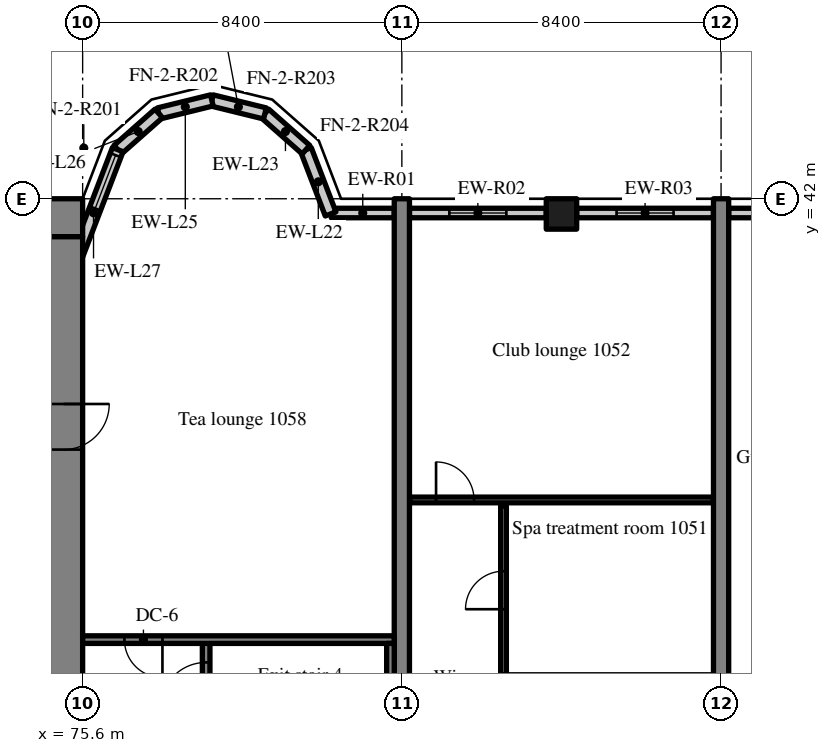
"""IFC4 building model, lengths in metres.
Left out: names, types, materials, properties, quantities, classifications, styles, units other than length and angle.
Written with IfcOpenShell. Run it as: python <this file> out.ifc"""

import sys

from ifc_helpers import new_model, si_unit, direction, frame, frame_2d, origin, origin_2d, place, context, subcontext, project, spatial, rectangle, extrude, source, transform, mapped, element, fill, save


model = new_model("IFC4")
c1 = context("Model", 3, precision=1e-05, world=origin(), true_north=direction((0.0, 1.0)))
c2 = subcontext(c1, "Body", "Model", "MODEL_VIEW")
j1 = project(units=[si_unit("LENGTHUNIT", "METRE"), si_unit("PLANEANGLEUNIT", "RADIAN")], contexts=[c1])
p1 = place(None, origin())
s1 = spatial("IfcSite", under=j1, at=p1, CompositionType="ELEMENT")
p2 = place(p1, origin())
s2 = spatial("IfcBuilding", under=s1, at=p2, CompositionType="ELEMENT")
p3 = place(p2, frame((0.0, 0.0, 46.8)))
s3 = spatial("IfcBuildingStorey", under=s2, at=p3, CompositionType="ELEMENT", Elevation=46.8)
m1 = source(origin(), c2, "Body", "SweptSolid", [
    extrude(rectangle(XDim=50.4, YDim=1.0, at=frame_2d((25.2, 0.0))), origin(), (0.0, 0.0, 1.0), 3.52),
])
p4 = place(p3, frame((25.2, 41.5, 0.0), z_axis=(0.0, 0.0, 1.0), x_axis=(1.0, 0.0, 0.0)))
e1 = element("IfcWall", 1, at=p4, inside=s3, PredefinedType="SHEAR", context=c2, shape_type="MappedRepresentation", body=[
    mapped(m1, transform((0.0, 0.0, 0.0), scale=1.0)),
])
m2 = source(origin(), c2, "Body", "SweptSolid", [
    extrude(rectangle(XDim=18.0, YDim=1.0, at=frame_2d((9.0, 0.0))), origin(), (0.0, 0.0, 1.0), 3.52),
])
p5 = place(p3, frame((75.1, 23.0, 0.0), z_axis=(0.0, 0.0, 1.0), x_axis=(0.0, 1.0, 0.0)))
e2 = element("IfcWall", 2, at=p5, inside=s3, PredefinedType="SHEAR", context=c2, shape_type="MappedRepresentation", body=[
    mapped(m2, transform((0.0, 0.0, 0.0), scale=1.0)),
])
m3 = source(origin(), c2, "Body", "SweptSolid", [
    extrude(rectangle(XDim=1.2, YDim=2.1, at=frame_2d((0.6, 1.05))), frame((0.0, 0.51, 0.0), z_axis=(0.0, -1.0, 0.0), x_axis=(1.0, 0.0, 0.0)), (0.0, 0.0, 1.0), 1.02),
])
p6 = place(p5, frame((12.4, 0.0, 0.0)))
e3 = element("IfcOpeningElement", 3, at=p6, cuts=e2, PredefinedType="OPENING", context=c2, shape_type="MappedRepresentation", body=[
    mapped(m3, transform((0.0, 0.0, 0.0), scale=1.0)),
])
m4 = source(origin(), c2, "Body", "SweptSolid", [
    extrude(rectangle(XDim=20.0, YDim=0.4, at=frame_2d((10.0, 0.0))), origin(), (0.0, 0.0, 1.0), 3.52),
])
for number, where, z_axis, x_axis in (
    (4, (84.0, 22.0, 0.0), (0.0, 0.0, 1.0), (0.0, 1.0, 0.0)),
    (5, (92.4, 22.0, 0.0), (0.0, 0.0, 1.0), (0.0, 1.0, 0.0)),
):
    element("IfcWall", number, at=place(p3, frame(where, z_axis=z_axis, x_axis=x_axis)), inside=s3, PredefinedType="SHEAR", context=c2, shape_type="MappedRepresentation", body=[
        mapped(m4, transform((0.0, 0.0, 0.0), scale=1.0)),
    ])
m5 = source(origin(), c2, "Body", "SweptSolid", [
    extrude(rectangle(XDim=0.8, YDim=0.8, at=origin_2d()), origin(), (0.0, 0.0, 1.0), 3.52),
])
p7 = place(p3, frame((88.2, 41.6, 0.0), z_axis=(0.0, 0.0, 1.0), x_axis=(1.0, 0.0, 0.0)))
e6 = element("IfcColumn", 6, at=p7, inside=s3, PredefinedType="COLUMN", context=c2, shape_type="MappedRepresentation", body=[
    mapped(m5, transform((0.0, 0.0, 0.0), scale=1.0)),
])
m6 = source(origin(), c2, "Body", "SweptSolid", [
    extrude(rectangle(XDim=1.658, YDim=0.25, at=frame_2d((0.829, 0.0))), origin(), (0.0, 0.0, 1.0), 2.82),
])
p8 = place(p3, frame((83.8, 41.625, 0.0), z_axis=(0.0, 0.0, 1.0), x_axis=(-1.0, 0.0, 0.0)))
e7 = element("IfcWall", 7, at=p8, inside=s3, PredefinedType="SOLIDWALL", context=c2, shape_type="MappedRepresentation", body=[
    mapped(m6, transform((0.0, 0.0, 0.0), scale=1.0)),
])
m7 = source(origin(), c2, "Body", "SweptSolid", [
    extrude(rectangle(XDim=3.6, YDim=0.25, at=frame_2d((1.8, 0.0))), origin(), (0.0, 0.0, 1.0), 2.82),
])
p9 = place(p3, frame((87.8, 41.625, 0.0), z_axis=(0.0, 0.0, 1.0), x_axis=(-1.0, 0.0, 0.0)))
e8 = element("IfcWall", 8, at=p9, inside=s3, PredefinedType="SOLIDWALL", context=c2, shape_type="MappedRepresentation", body=[
    mapped(m7, transform((0.0, 0.0, 0.0), scale=1.0)),
])
m8 = source(origin(), c2, "Body", "SweptSolid", [
    extrude(rectangle(XDim=1.5, YDim=1.5, at=frame_2d((0.75, 0.75))), frame((0.0, 0.135, 0.0), z_axis=(0.0, -1.0, 0.0), x_axis=(1.0, 0.0, 0.0)), (0.0, 0.0, 1.0), 0.27),
])
p10 = place(p9, frame((1.05, 0.0, 0.9)))
e9 = element("IfcOpeningElement", 9, at=p10, cuts=e8, PredefinedType="OPENING", context=c2, shape_type="MappedRepresentation", body=[
    mapped(m8, transform((0.0, 0.0, 0.0), scale=1.0)),
])
m9 = source(origin(), c2, "Body", "SweptSolid", [
    extrude(rectangle(XDim=3.6, YDim=0.25, at=frame_2d((1.8, 0.0))), origin(), (0.0, 0.0, 1.0), 2.82),
])
p11 = place(p3, frame((92.2, 41.625, 0.0), z_axis=(0.0, 0.0, 1.0), x_axis=(-1.0, 0.0, 0.0)))
e10 = element("IfcWall", 10, at=p11, inside=s3, PredefinedType="SOLIDWALL", context=c2, shape_type="MappedRepresentation", body=[
    mapped(m9, transform((0.0, 0.0, 0.0), scale=1.0)),
])
p12 = place(p11, frame((1.05, 0.0, 0.9)))
e11 = element("IfcOpeningElement", 11, at=p12, cuts=e10, PredefinedType="OPENING", context=c2, shape_type="MappedRepresentation", body=[
    mapped(m8, transform((0.0, 0.0, 0.0), scale=1.0)),
])
m10 = source(origin(), c2, "Body", "SweptSolid", [
    extrude(rectangle(XDim=4.045, YDim=0.25, at=frame_2d((2.022, 0.0))), origin(), (0.0, 0.0, 1.0), 2.82),
])
p13 = place(p3, frame((96.645, 41.625, 0.0), z_axis=(0.0, 0.0, 1.0), x_axis=(-1.0, 0.0, 0.0)))
e12 = element("IfcWall", 12, at=p13, inside=s3, PredefinedType="SOLIDWALL", context=c2, shape_type="MappedRepresentation", body=[
    mapped(m10, transform((0.0, 0.0, 0.0), scale=1.0)),
])
p14 = place(p13, frame((1.272, 0.0, 0.9)))
e13 = element("IfcOpeningElement", 13, at=p14, cuts=e12, PredefinedType="OPENING", context=c2, shape_type="MappedRepresentation", body=[
    mapped(m8, transform((0.0, 0.0, 0.0), scale=1.0)),
])
m11 = source(origin(), c2, "Body", "SweptSolid", [
    extrude(rectangle(XDim=1.812, YDim=0.3, at=frame_2d((0.906, 0.0))), origin(), (0.0, 0.0, 1.0), 3.52),
])
p15 = place(p3, frame((82.125, 41.6, 0.0), z_axis=(0.0, 0.0, 1.0), x_axis=(-0.357877270961, 0.93376863244, 0.0)))
e14 = element("IfcWall", 14, at=p15, inside=s3, PredefinedType="SOLIDWALL", context=c2, shape_type="MappedRepresentation", body=[
    mapped(m11, transform((0.0, 0.0, 0.0), scale=1.0)),
])
m12 = source(origin(), c2, "Body", "SweptSolid", [
    extrude(rectangle(XDim=1.44, YDim=0.3, at=frame_2d((0.72, 0.0))), origin(), (0.0, 0.0, 1.0), 3.52),
])
p16 = place(p3, frame((81.477, 43.292, 0.0), z_axis=(0.0, 0.0, 1.0), x_axis=(-0.74957555648, 0.661918790432, 0.0)))
e15 = element("IfcWall", 15, at=p16, inside=s3, PredefinedType="SOLIDWALL", context=c2, shape_type="MappedRepresentation", body=[
    mapped(m12, transform((0.0, 0.0, 0.0), scale=1.0)),
])
m13 = source(origin(), c2, "Body", "SweptSolid", [
    extrude(rectangle(XDim=1.439, YDim=0.3, at=frame_2d((0.719, 0.0))), origin(), (0.0, 0.0, 1.0), 3.52),
])
for number, where, z_axis, x_axis in (
    (16, (80.397, 44.245, 0.0), (0.0, 0.0, 1.0), (-0.971, 0.238, 0.0)),
    (17, (79.0, 44.588, 0.0), (0.0, 0.0, 1.0), (-0.971, -0.238, 0.0)),
):
    element("IfcWall", number, at=place(p3, frame(where, z_axis=z_axis, x_axis=x_axis)), inside=s3, PredefinedType="SOLIDWALL", context=c2, shape_type="MappedRepresentation", body=[
        mapped(m13, transform((0.0, 0.0, 0.0), scale=1.0)),
    ])
p17 = place(p3, frame((77.603, 44.245, 0.0), z_axis=(0.0, 0.0, 1.0), x_axis=(-0.74957555648, -0.661918790432, 0.0)))
e18 = element("IfcWall", 18, at=p17, inside=s3, PredefinedType="SOLIDWALL", context=c2, shape_type="MappedRepresentation", body=[
    mapped(m12, transform((0.0, 0.0, 0.0), scale=1.0)),
])
m14 = source(origin(), c2, "Body", "SweptSolid", [
    extrude(rectangle(XDim=3.559, YDim=0.3, at=frame_2d((1.78, 0.0))), origin(), (0.0, 0.0, 1.0), 3.52),
])
p18 = place(p3, frame((76.523, 43.292, 0.0), z_axis=(0.0, 0.0, 1.0), x_axis=(-0.35779745313, -0.933799219604, 0.0)))
e19 = element("IfcWall", 19, at=p18, inside=s3, PredefinedType="SOLIDWALL", context=c2, shape_type="MappedRepresentation", body=[
    mapped(m14, transform((0.0, 0.0, 0.0), scale=1.0)),
])
m15 = source(origin(), c2, "Body", "SweptSolid", [
    extrude(rectangle(XDim=1.5, YDim=2.0, at=frame_2d((0.75, 1.0))), frame((0.0, 0.16, 0.0), z_axis=(0.0, -1.0, 0.0), x_axis=(1.0, 0.0, 0.0)), (0.0, 0.0, 1.0), 0.32),
])
p19 = place(p18, frame((0.156, 0.0, 0.9)))
e20 = element("IfcOpeningElement", 20, at=p19, cuts=e19, PredefinedType="OPENING", context=c2, shape_type="MappedRepresentation", body=[
    mapped(m15, transform((0.0, 0.0, 0.0), scale=1.0)),
])
m16 = source(origin(), c2, "Body", "SweptSolid", [
    extrude(rectangle(XDim=8.3, YDim=0.2, at=frame_2d((4.15, 0.0))), origin(), (0.0, 0.0, 1.0), 3.52),
])
p20 = place(p3, frame((78.85, 22.1, 0.0), z_axis=(0.0, 0.0, 1.0), x_axis=(0.0, 1.0, 0.0)))
e21 = element("IfcWall", 21, at=p20, inside=s3, PredefinedType="SOLIDWALL", context=c2, shape_type="MappedRepresentation", body=[
    mapped(m16, transform((0.0, 0.0, 0.0), scale=1.0)),
])
m17 = source(origin(), c2, "Body", "SweptSolid", [
    extrude(rectangle(XDim=1.2, YDim=2.1, at=frame_2d((0.6, 1.05))), frame((0.0, 0.11, 0.0), z_axis=(0.0, -1.0, 0.0), x_axis=(1.0, 0.0, 0.0)), (0.0, 0.0, 1.0), 0.22),
])
p21 = place(p20, frame((6.5, 0.0, 0.0)))
e22 = element("IfcOpeningElement", 22, at=p21, cuts=e21, PredefinedType="OPENING", context=c2, shape_type="MappedRepresentation", body=[
    mapped(m17, transform((0.0, 0.0, 0.0), scale=1.0)),
])
m18 = source(origin(), c2, "Body", "SweptSolid", [
    extrude(rectangle(XDim=8.2, YDim=0.2, at=frame_2d((4.1, 0.0))), origin(), (0.0, 0.0, 1.0), 3.52),
])
p22 = place(p3, frame((83.8, 30.4, 0.0), z_axis=(0.0, 0.0, 1.0), x_axis=(-1.0, 0.0, 0.0)))
e23 = element("IfcWall", 23, at=p22, inside=s3, PredefinedType="SOLIDWALL", context=c2, shape_type="MappedRepresentation", body=[
    mapped(m18, transform((0.0, 0.0, 0.0), scale=1.0)),
])
m19 = source(origin(), c2, "Body", "SweptSolid", [
    extrude(rectangle(XDim=1.0, YDim=2.1, at=frame_2d((0.5, 1.05))), frame((0.0, 0.11, 0.0), z_axis=(0.0, -1.0, 0.0), x_axis=(1.0, 0.0, 0.0)), (0.0, 0.0, 1.0), 0.22),
])
p23 = place(p22, frame((6.1, 0.0, 0.0)))
e24 = element("IfcOpeningElement", 24, at=p23, cuts=e23, PredefinedType="OPENING", context=c2, shape_type="MappedRepresentation", body=[
    mapped(m19, transform((0.0, 0.0, 0.0), scale=1.0)),
])
m20 = source(origin(), c2, "Body", "SweptSolid", [
    extrude(rectangle(XDim=8.1, YDim=0.2, at=frame_2d((4.05, 0.0))), origin(), (0.0, 0.0, 1.0), 3.52),
])
p24 = place(p3, frame((83.7, 22.2, 0.0), z_axis=(0.0, 0.0, 1.0), x_axis=(0.0, 1.0, 0.0)))
e25 = element("IfcWall", 25, at=p24, inside=s3, PredefinedType="SOLIDWALL", context=c2, shape_type="MappedRepresentation", body=[
    mapped(m20, transform((0.0, 0.0, 0.0), scale=1.0)),
])
m21 = source(origin(), c2, "Body", "SweptSolid", [
    extrude(rectangle(XDim=4.45, YDim=0.15, at=frame_2d((2.225, 0.0))), origin(), (0.0, 0.0, 1.0), 3.52),
])
p25 = place(p3, frame((86.675, 29.475, 0.0), z_axis=(0.0, 0.0, 1.0), x_axis=(0.0, 1.0, 0.0)))
e26 = element("IfcWall", 26, at=p25, inside=s3, PredefinedType="PARTITIONING", context=c2, shape_type="MappedRepresentation", body=[
    mapped(m21, transform((0.0, 0.0, 0.0), scale=1.0)),
])
m22 = source(origin(), c2, "Body", "SweptSolid", [
    extrude(rectangle(XDim=1.0, YDim=2.1, at=frame_2d((0.5, 1.05))), frame((0.0, 0.085, 0.0), z_axis=(0.0, -1.0, 0.0), x_axis=(1.0, 0.0, 0.0)), (0.0, 0.0, 1.0), 0.17),
])
p26 = place(p25, frame((1.725, 0.0, 0.0)))
e27 = element("IfcOpeningElement", 27, at=p26, cuts=e26, PredefinedType="OPENING", context=c2, shape_type="MappedRepresentation", body=[
    mapped(m22, transform((0.0, 0.0, 0.0), scale=1.0)),
])
m23 = source(origin(), c2, "Body", "SweptSolid", [
    extrude(rectangle(XDim=8.0, YDim=0.15, at=frame_2d((4.0, 0.0))), origin(), (0.0, 0.0, 1.0), 3.52),
])
p27 = place(p3, frame((84.2, 34.075, 0.0), z_axis=(0.0, 0.0, 1.0), x_axis=(1.0, 0.0, 0.0)))
e28 = element("IfcWall", 28, at=p27, inside=s3, PredefinedType="PARTITIONING", context=c2, shape_type="MappedRepresentation", body=[
    mapped(m23, transform((0.0, 0.0, 0.0), scale=1.0)),
])
p28 = place(p27, frame((0.7, 0.0, 0.0)))
e29 = element("IfcOpeningElement", 29, at=p28, cuts=e28, PredefinedType="OPENING", context=c2, shape_type="MappedRepresentation", body=[
    mapped(m22, transform((0.0, 0.0, 0.0), scale=1.0)),
])
m24 = source(origin(), c2, "Body", "SweptSolid", [
    extrude(rectangle(XDim=1.5, YDim=1.5, at=frame_2d((0.75, 0.75))), frame((0.0, 0.03, 0.0), z_axis=(0.0, -1.0, 0.0), x_axis=(1.0, 0.0, 0.0)), (0.0, 0.0, 1.0), 0.06),
])
p29 = place(p10, origin())
e30 = element("IfcWindow", 30, at=p29, inside=s3, PartitioningType="SINGLE_PANEL", PredefinedType="WINDOW", context=c2, shape_type="MappedRepresentation", body=[
    mapped(m24, transform((0.0, 0.0, 0.0), scale=1.0)),
])
fill(e9, e30)
p30 = place(p12, origin())
e31 = element("IfcWindow", 31, at=p30, inside=s3, PartitioningType="SINGLE_PANEL", PredefinedType="WINDOW", context=c2, shape_type="MappedRepresentation", body=[
    mapped(m24, transform((0.0, 0.0, 0.0), scale=1.0)),
])
fill(e11, e31)
m25 = source(origin(), c2, "Body", "SweptSolid", [
    extrude(rectangle(XDim=1.5, YDim=2.0, at=frame_2d((0.75, 1.0))), frame((0.0, 0.03, 0.0), z_axis=(0.0, -1.0, 0.0), x_axis=(1.0, 0.0, 0.0)), (0.0, 0.0, 1.0), 0.06),
])
p31 = place(p19, origin())
e32 = element("IfcWindow", 32, at=p31, inside=s3, PartitioningType="SINGLE_PANEL", PredefinedType="WINDOW", context=c2, shape_type="MappedRepresentation", body=[
    mapped(m25, transform((0.0, 0.0, 0.0), scale=1.0)),
])
fill(e20, e32)
m26 = source(origin(), c2, "Body", "SweptSolid", [
    extrude(rectangle(XDim=1.2, YDim=2.1, at=frame_2d((0.6, 1.05))), frame((0.0, 0.025, 0.0), z_axis=(0.0, -1.0, 0.0), x_axis=(1.0, 0.0, 0.0)), (0.0, 0.0, 1.0), 0.05),
])
p32 = place(p6, origin())
e33 = element("IfcDoor", 33, at=p32, inside=s3, OperationType="SINGLE_SWING_RIGHT", PredefinedType="DOOR", context=c2, shape_type="MappedRepresentation", body=[
    mapped(m26, transform((0.0, 0.0, 0.0), scale=1.0)),
])
fill(e3, e33)
p33 = place(p21, origin())
e34 = element("IfcDoor", 34, at=p33, inside=s3, OperationType="SINGLE_SWING_LEFT", PredefinedType="DOOR", context=c2, shape_type="MappedRepresentation", body=[
    mapped(m26, transform((0.0, 0.0, 0.0), scale=1.0)),
])
fill(e22, e34)
m27 = source(origin(), c2, "Body", "SweptSolid", [
    extrude(rectangle(XDim=1.0, YDim=2.1, at=frame_2d((0.5, 1.05))), frame((0.0, 0.025, 0.0), z_axis=(0.0, -1.0, 0.0), x_axis=(1.0, 0.0, 0.0)), (0.0, 0.0, 1.0), 0.05),
])
p34 = place(p23, origin())
e35 = element("IfcDoor", 35, at=p34, inside=s3, OperationType="SINGLE_SWING_LEFT", PredefinedType="DOOR", context=c2, shape_type="MappedRepresentation", body=[
    mapped(m27, transform((0.0, 0.0, 0.0), scale=1.0)),
])
fill(e24, e35)
p35 = place(p26, origin())
e36 = element("IfcDoor", 36, at=p35, inside=s3, OperationType="SINGLE_SWING_LEFT", PredefinedType="DOOR", context=c2, shape_type="MappedRepresentation", body=[
    mapped(m27, transform((0.0, 0.0, 0.0), scale=1.0)),
])
fill(e27, e36)
p36 = place(p28, origin())
e37 = element("IfcDoor", 37, at=p36, inside=s3, OperationType="SINGLE_SWING_LEFT", PredefinedType="DOOR", context=c2, shape_type="MappedRepresentation", body=[
    mapped(m27, transform((0.0, 0.0, 0.0), scale=1.0)),
])
fill(e29, e37)
save(model, sys.argv[1])
